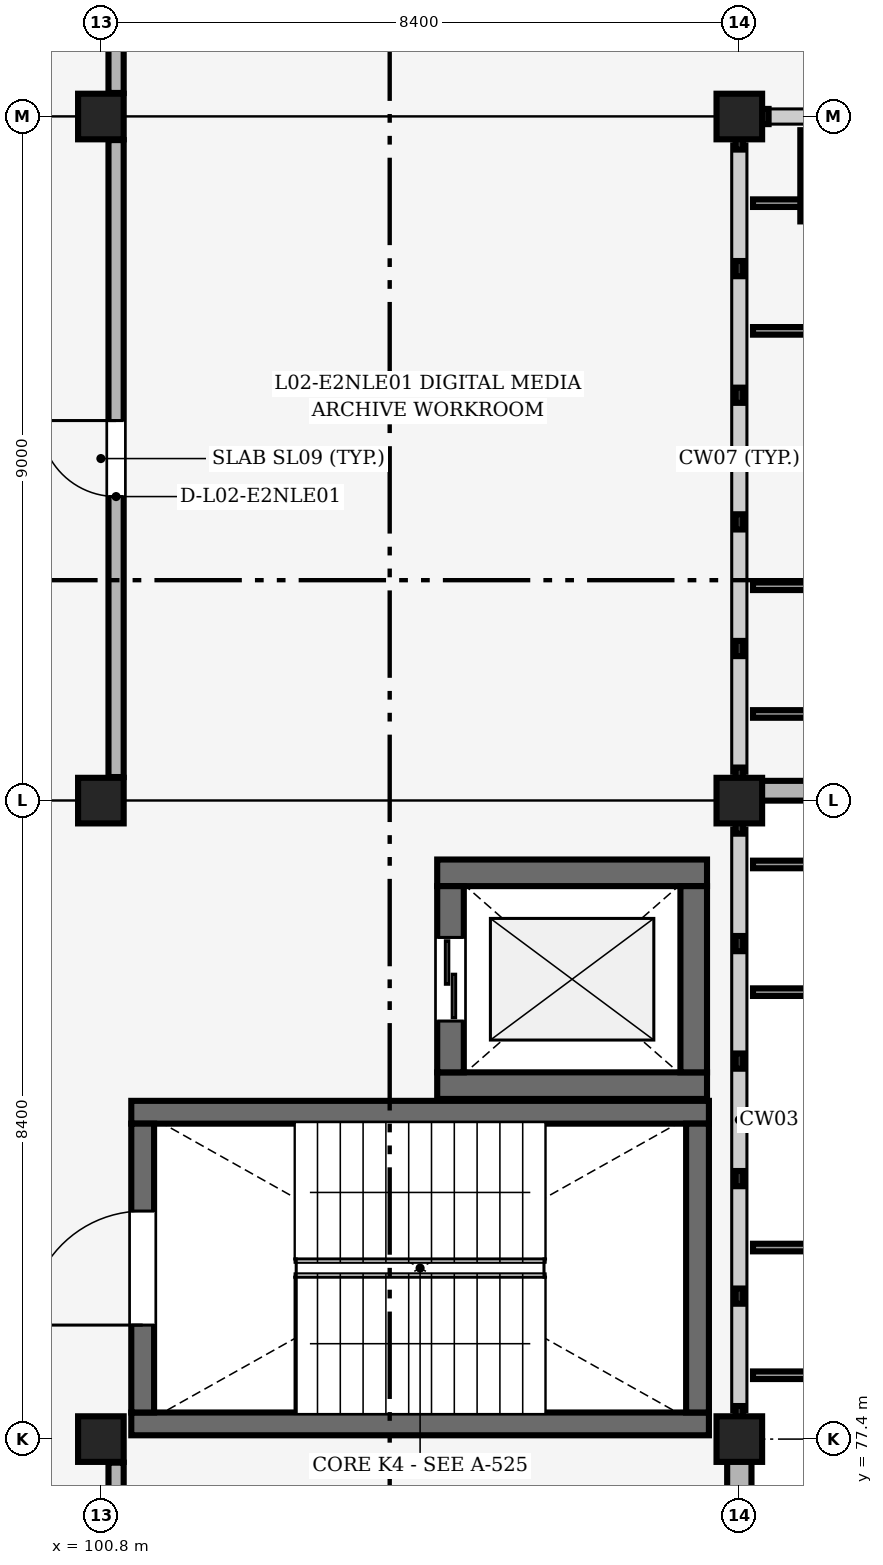
"""IFC4 building model, lengths in metres.
Left out: names, types, materials, properties, quantities, classifications, styles, units other than length and angle.
Written with IfcOpenShell. Run it as: python <this file> out.ifc"""

import sys

from ifc_helpers import new_model, si_unit, direction, frame, frame_2d, origin, origin_2d, place, context, subcontext, project, spatial, rectangle, extrude, element, fill, save


model = new_model("IFC4")
c1 = context("Model", 3, precision=1e-05, world=origin(), true_north=direction((0.0, 1.0)))
c2 = subcontext(c1, "Body", "Model", "MODEL_VIEW")
j1 = project(units=[si_unit("LENGTHUNIT", "METRE"), si_unit("PLANEANGLEUNIT", "RADIAN")], contexts=[c1])
p1 = place(None, origin())
s1 = spatial("IfcSite", under=j1, at=p1, CompositionType="ELEMENT")
p2 = place(p1, origin())
s2 = spatial("IfcBuilding", under=s1, at=p2, CompositionType="ELEMENT")
p3 = place(p2, frame((0.0, 0.0, 9.0)))
s3 = spatial("IfcBuildingStorey", under=s2, at=p3, CompositionType="ELEMENT", Elevation=9.0)
for number, where, z_axis, x_axis in (
    (1, (100.8, 77.4, 0.0), (0.0, 0.0, 1.0), (1.0, 0.0, 0.0)),
    (2, (100.8, 85.8, 0.0), (0.0, 0.0, 1.0), (1.0, 0.0, 0.0)),
    (3, (100.8, 94.8, 0.0), (0.0, 0.0, 1.0), (1.0, 0.0, 0.0)),
    (4, (109.2, 77.4, 0.0), (0.0, 0.0, 1.0), (1.0, 0.0, 0.0)),
    (5, (109.2, 85.8, 0.0), (0.0, 0.0, 1.0), (1.0, 0.0, 0.0)),
    (6, (109.2, 94.8, 0.0), (0.0, 0.0, 1.0), (1.0, 0.0, 0.0)),
):
    element("IfcColumn", number, at=place(p3, frame(where, z_axis=z_axis, x_axis=x_axis)), inside=s3, PredefinedType="COLUMN", context=c2, shape_type="SweptSolid", body=[
        extrude(rectangle(XDim=0.6, YDim=0.6, at=origin_2d()), origin(), (0.0, 0.0, 1.0), 4.2),
    ])
p4 = place(p3, frame((109.2, 69.275, 0.0), z_axis=(0.0, 0.0, 1.0), x_axis=(0.0, 1.0, 0.0)))
e7 = element("IfcWall", 7, at=p4, inside=s3, PredefinedType="SOLIDWALL", context=c2, shape_type="SweptSolid", body=[
    extrude(rectangle(XDim=7.85, YDim=0.32, at=frame_2d((3.925, 0.0))), origin(), (0.0, 0.0, 1.0), 3.29),
])
p5 = place(p4, frame((0.45, 0.0, 0.85)))
e8 = element("IfcOpeningElement", 8, at=p5, cuts=e7, PredefinedType="OPENING", context=c2, shape_type="SweptSolid", body=[
    extrude(rectangle(XDim=1.2, YDim=1.8, at=frame_2d((0.6, 0.9))), frame((0.0, 0.17, 0.0), z_axis=(0.0, -1.0, 0.0), x_axis=(1.0, 0.0, 0.0)), (0.0, 0.0, 1.0), 0.34),
])
p6 = place(p4, frame((6.2, 0.0, 0.85)))
e9 = element("IfcOpeningElement", 9, at=p6, cuts=e7, PredefinedType="OPENING", context=c2, shape_type="SweptSolid", body=[
    extrude(rectangle(XDim=1.2, YDim=1.8, at=frame_2d((0.6, 0.9))), frame((0.0, 0.17, 0.0), z_axis=(0.0, -1.0, 0.0), x_axis=(1.0, 0.0, 0.0)), (0.0, 0.0, 1.0), 0.34),
])
p7 = place(p3, frame((109.33, 85.93, 0.0), z_axis=(0.0, 0.0, 1.0), x_axis=(1.0, 0.0, 0.0)))
e10 = element("IfcWall", 10, at=p7, inside=s3, PredefinedType="PARAPET", context=c2, shape_type="SweptSolid", body=[
    extrude(rectangle(XDim=8.14, YDim=0.26, at=frame_2d((4.07, 0.0))), origin(), (0.0, 0.0, 1.0), 0.85),
])
for number, where, z_axis, x_axis in (
    (11, (101.2, 77.6, 0.0), (0.0, 0.0, 1.0), (1.0, 0.0, 0.0)),
    (12, (101.2, 81.7, 0.0), (0.0, 0.0, 1.0), (1.0, 0.0, 0.0)),
):
    element("IfcWall", number, at=place(p3, frame(where, z_axis=z_axis, x_axis=x_axis)), inside=s3, PredefinedType="SHEAR", context=c2, shape_type="SweptSolid", body=[
        extrude(rectangle(XDim=7.6, YDim=0.3, at=frame_2d((3.8, 0.0))), origin(), (0.0, 0.0, 1.0), 4.025),
    ])
p8 = place(p3, frame((101.35, 77.75, 0.0), z_axis=(0.0, 0.0, 1.0), x_axis=(0.0, 1.0, 0.0)))
e13 = element("IfcWall", 13, at=p8, inside=s3, PredefinedType="SHEAR", context=c2, shape_type="SweptSolid", body=[
    extrude(rectangle(XDim=3.8, YDim=0.3, at=frame_2d((1.9, 0.0))), origin(), (0.0, 0.0, 1.0), 4.025),
])
p9 = place(p8, frame((1.15, 0.0, 0.0)))
e14 = element("IfcOpeningElement", 14, at=p9, cuts=e13, PredefinedType="OPENING", context=c2, shape_type="SweptSolid", body=[
    extrude(rectangle(XDim=1.5, YDim=2.2, at=frame_2d((0.75, 1.1))), frame((0.0, 0.16, 0.0), z_axis=(0.0, -1.0, 0.0), x_axis=(1.0, 0.0, 0.0)), (0.0, 0.0, 1.0), 0.32),
])
p10 = place(p3, frame((108.65, 77.75, 0.0), z_axis=(0.0, 0.0, 1.0), x_axis=(0.0, 1.0, 0.0)))
e15 = element("IfcWall", 15, at=p10, inside=s3, PredefinedType="SHEAR", context=c2, shape_type="SweptSolid", body=[
    extrude(rectangle(XDim=3.8, YDim=0.3, at=frame_2d((1.9, 0.0))), origin(), (0.0, 0.0, 1.0), 4.025),
])
for number, where, z_axis, x_axis in (
    (16, (105.225, 82.05, 0.0), (0.0, 0.0, 1.0), (1.0, 0.0, 0.0)),
    (17, (105.225, 84.85, 0.0), (0.0, 0.0, 1.0), (1.0, 0.0, 0.0)),
):
    element("IfcWall", number, at=place(p3, frame(where, z_axis=z_axis, x_axis=x_axis)), inside=s3, PredefinedType="SHEAR", context=c2, shape_type="SweptSolid", body=[
        extrude(rectangle(XDim=3.55, YDim=0.35, at=frame_2d((1.775, 0.0))), origin(), (0.0, 0.0, 1.0), 3.92),
    ])
p11 = place(p3, frame((105.4, 82.225, 0.0), z_axis=(0.0, 0.0, 1.0), x_axis=(0.0, 1.0, 0.0)))
e18 = element("IfcWall", 18, at=p11, inside=s3, PredefinedType="SHEAR", context=c2, shape_type="SweptSolid", body=[
    extrude(rectangle(XDim=2.45, YDim=0.35, at=frame_2d((1.225, 0.0))), origin(), (0.0, 0.0, 1.0), 3.92),
])
p12 = place(p11, frame((0.675, 0.0, 0.0)))
e19 = element("IfcOpeningElement", 19, at=p12, cuts=e18, PredefinedType="OPENING", context=c2, shape_type="SweptSolid", body=[
    extrude(rectangle(XDim=1.1, YDim=2.2, at=frame_2d((0.55, 1.1))), frame((0.0, 0.185, 0.0), z_axis=(0.0, -1.0, 0.0), x_axis=(1.0, 0.0, 0.0)), (0.0, 0.0, 1.0), 0.37),
])
p13 = place(p3, frame((108.6, 82.225, 0.0), z_axis=(0.0, 0.0, 1.0), x_axis=(0.0, 1.0, 0.0)))
e20 = element("IfcWall", 20, at=p13, inside=s3, PredefinedType="SHEAR", context=c2, shape_type="SweptSolid", body=[
    extrude(rectangle(XDim=2.45, YDim=0.35, at=frame_2d((1.225, 0.0))), origin(), (0.0, 0.0, 1.0), 3.92),
])
p14 = place(p3, frame((101.0, 95.11, 0.0), z_axis=(0.0, 0.0, 1.0), x_axis=(0.0, 1.0, 0.0)))
e21 = element("IfcWall", 21, at=p14, inside=s3, PredefinedType="PARTITIONING", context=c2, shape_type="SweptSolid", body=[
    extrude(rectangle(XDim=5.785, YDim=0.2, at=frame_2d((2.893, 0.0))), origin(), (0.0, 0.0, 1.0), 3.01),
])
p15 = place(p3, frame((101.0, 86.11, 0.0), z_axis=(0.0, 0.0, 1.0), x_axis=(0.0, 1.0, 0.0)))
e22 = element("IfcWall", 22, at=p15, inside=s3, PredefinedType="PARTITIONING", context=c2, shape_type="SweptSolid", body=[
    extrude(rectangle(XDim=8.38, YDim=0.2, at=frame_2d((4.19, 0.0))), origin(), (0.0, 0.0, 1.0), 2.99),
])
p16 = place(p15, frame((3.69, 0.0, 0.0)))
e23 = element("IfcOpeningElement", 23, at=p16, cuts=e22, PredefinedType="OPENING", context=c2, shape_type="SweptSolid", body=[
    extrude(rectangle(XDim=1.0, YDim=2.15, at=frame_2d((0.5, 1.075))), frame((0.0, 0.11, 0.0), z_axis=(0.0, -1.0, 0.0), x_axis=(1.0, 0.0, 0.0)), (0.0, 0.0, 1.0), 0.22),
])
p17 = place(p3, frame((101.0, 69.31, 0.0), z_axis=(0.0, 0.0, 1.0), x_axis=(0.0, 1.0, 0.0)))
e24 = element("IfcWall", 24, at=p17, inside=s3, PredefinedType="PARTITIONING", context=c2, shape_type="SweptSolid", body=[
    extrude(rectangle(XDim=7.78, YDim=0.2, at=frame_2d((3.89, 0.0))), origin(), (0.0, 0.0, 1.0), 3.09),
])
p18 = place(p17, frame((1.39, 0.0, 0.0)))
e25 = element("IfcOpeningElement", 25, at=p18, cuts=e24, PredefinedType="OPENING", context=c2, shape_type="SweptSolid", body=[
    extrude(rectangle(XDim=0.9, YDim=2.1, at=frame_2d((0.45, 1.05))), frame((0.0, 0.11, 0.0), z_axis=(0.0, -1.0, 0.0), x_axis=(1.0, 0.0, 0.0)), (0.0, 0.0, 1.0), 0.22),
])
p19 = place(p17, frame((4.99, 0.0, 0.0)))
e26 = element("IfcOpeningElement", 26, at=p19, cuts=e24, PredefinedType="OPENING", context=c2, shape_type="SweptSolid", body=[
    extrude(rectangle(XDim=1.0, YDim=2.15, at=frame_2d((0.5, 1.075))), frame((0.0, 0.11, 0.0), z_axis=(0.0, -1.0, 0.0), x_axis=(1.0, 0.0, 0.0)), (0.0, 0.0, 1.0), 0.22),
])
p20 = place(p9, origin())
e27 = element("IfcDoor", 27, at=p20, inside=s3, OperationType="DOUBLE_DOOR_SINGLE_SWING", PredefinedType="DOOR", context=c2, shape_type="SweptSolid", body=[
    extrude(rectangle(XDim=1.5, YDim=2.2, at=frame_2d((0.75, 1.1))), frame((0.0, 0.025, 0.0), z_axis=(0.0, -1.0, 0.0), x_axis=(1.0, 0.0, 0.0)), (0.0, 0.0, 1.0), 0.05),
])
fill(e14, e27)
p21 = place(p12, origin())
e28 = element("IfcDoor", 28, at=p21, inside=s3, OperationType="DOUBLE_DOOR_SLIDING", PredefinedType="DOOR", context=c2, shape_type="SweptSolid", body=[
    extrude(rectangle(XDim=1.1, YDim=2.2, at=frame_2d((0.55, 1.1))), frame((0.0, 0.025, 0.0), z_axis=(0.0, -1.0, 0.0), x_axis=(1.0, 0.0, 0.0)), (0.0, 0.0, 1.0), 0.05),
])
fill(e19, e28)
p22 = place(p16, origin())
e29 = element("IfcDoor", 29, at=p22, inside=s3, OperationType="SINGLE_SWING_RIGHT", PredefinedType="DOOR", context=c2, shape_type="SweptSolid", body=[
    extrude(rectangle(XDim=1.0, YDim=2.15, at=frame_2d((0.5, 1.075))), frame((0.0, 0.025, 0.0), z_axis=(0.0, -1.0, 0.0), x_axis=(1.0, 0.0, 0.0)), (0.0, 0.0, 1.0), 0.05),
])
fill(e23, e29)
save(model, sys.argv[1])
